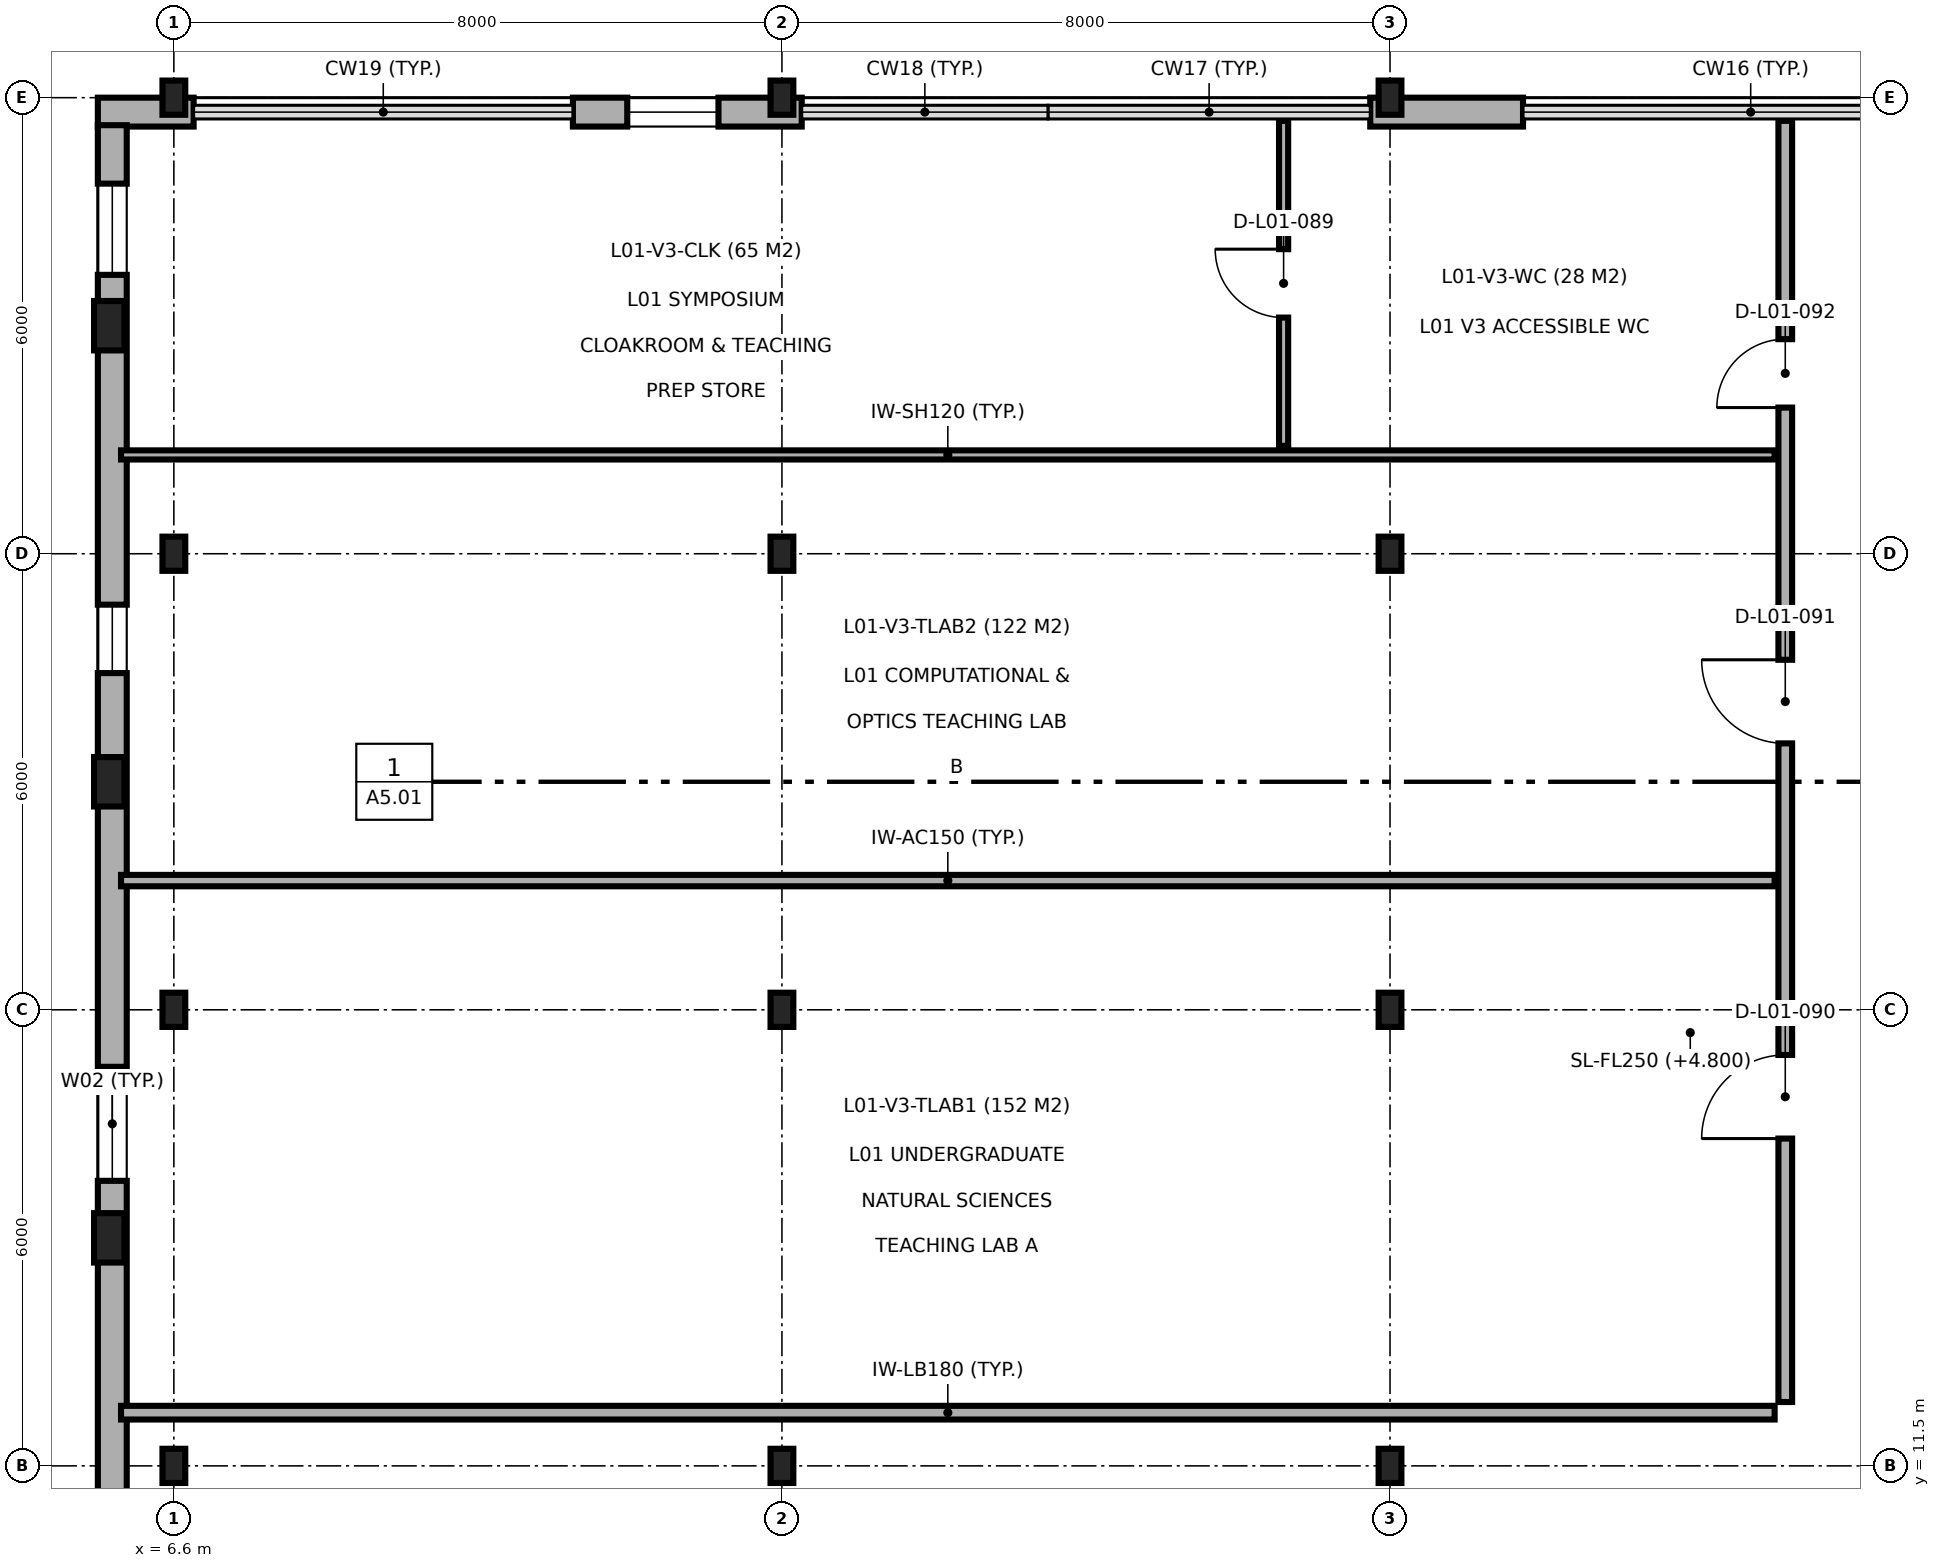
"""IFC4 building model, lengths in metres.
Left out: names, types, materials, properties, quantities, classifications, styles, units other than length and angle.
Written with IfcOpenShell. Run it as: python <this file> out.ifc"""

import sys

from ifc_helpers import new_model, si_unit, direction, frame, frame_2d, origin, origin_2d, place, context, subcontext, project, spatial, rectangle, i_section, extrude, element, fill, save


model = new_model("IFC4")
c1 = context("Model", 3, precision=1e-05, world=origin(), true_north=direction((0.0, 1.0)))
c2 = subcontext(c1, "Body", "Model", "MODEL_VIEW")
j1 = project(units=[si_unit("LENGTHUNIT", "METRE"), si_unit("PLANEANGLEUNIT", "RADIAN")], contexts=[c1])
p1 = place(None, origin())
s1 = spatial("IfcSite", under=j1, at=p1, CompositionType="ELEMENT")
p2 = place(p1, origin())
s2 = spatial("IfcBuilding", under=s1, at=p2, CompositionType="ELEMENT")
p3 = place(p2, frame((0.0, 0.0, 4.8)))
s3 = spatial("IfcBuildingStorey", under=s2, at=p3, CompositionType="ELEMENT", Elevation=4.8)
for number, where, z_axis, x_axis in (
    (1, (5.75, 14.5, 0.0), (0.0, 0.0, 1.0), (1.0, 0.0, 0.0)),
    (2, (5.75, 20.5, 0.0), (0.0, 0.0, 1.0), (1.0, 0.0, 0.0)),
    (3, (5.75, 26.5, 0.0), (0.0, 0.0, 1.0), (1.0, 0.0, 0.0)),
):
    element("IfcColumn", number, at=place(p3, frame(where, z_axis=z_axis, x_axis=x_axis)), inside=s3, PredefinedType="PILASTER", context=c2, shape_type="SweptSolid", body=[
        extrude(rectangle(XDim=0.4, YDim=0.65, at=origin_2d()), origin(), (0.0, 0.0, 1.0), 4.5),
    ])
for number, where, z_axis, x_axis in (
    (4, (6.6, 11.5, 0.0), (0.0, 0.0, 1.0), (1.0, 0.0, 0.0)),
    (5, (6.6, 17.5, 0.0), (0.0, 0.0, 1.0), (1.0, 0.0, 0.0)),
    (6, (6.6, 23.5, 0.0), (0.0, 0.0, 1.0), (1.0, 0.0, 0.0)),
    (7, (6.6, 29.5, 0.0), (0.0, 0.0, 1.0), (1.0, 0.0, 0.0)),
    (8, (14.6, 11.5, 0.0), (0.0, 0.0, 1.0), (1.0, 0.0, 0.0)),
    (9, (14.6, 17.5, 0.0), (0.0, 0.0, 1.0), (1.0, 0.0, 0.0)),
    (10, (14.6, 23.5, 0.0), (0.0, 0.0, 1.0), (1.0, 0.0, 0.0)),
    (11, (14.6, 29.5, 0.0), (0.0, 0.0, 1.0), (1.0, 0.0, 0.0)),
    (12, (22.6, 11.5, 0.0), (0.0, 0.0, 1.0), (1.0, 0.0, 0.0)),
    (13, (22.6, 17.5, 0.0), (0.0, 0.0, 1.0), (1.0, 0.0, 0.0)),
    (14, (22.6, 23.5, 0.0), (0.0, 0.0, 1.0), (1.0, 0.0, 0.0)),
    (15, (22.6, 29.5, 0.0), (0.0, 0.0, 1.0), (1.0, 0.0, 0.0)),
):
    element("IfcColumn", number, at=place(p3, frame(where, z_axis=z_axis, x_axis=x_axis)), inside=s3, PredefinedType="COLUMN", context=c2, shape_type="SweptSolid", body=[
        extrude(i_section(OverallWidth=0.3, OverallDepth=0.45, WebThickness=0.014, FlangeThickness=0.026, FilletRadius=0.027, at=origin_2d()), origin(), (0.0, 0.0, 1.0), 4.5),
    ])
p4 = place(p3, frame((24.35, 29.31, 0.0), z_axis=(0.0, 0.0, 1.0), x_axis=(-1.0, 0.0, 0.0)))
e16 = element("IfcWall", 16, at=p4, inside=s3, PredefinedType="SOLIDWALL", context=c2, shape_type="SweptSolid", body=[
    extrude(rectangle(XDim=2.01, YDim=0.38, at=frame_2d((1.005, 0.0))), origin(), (0.0, 0.0, 1.0), 4.25),
])
p5 = place(p3, frame((14.86, 29.31, 0.0), z_axis=(0.0, 0.0, 1.0), x_axis=(-1.0, 0.0, 0.0)))
e17 = element("IfcWall", 17, at=p5, inside=s3, PredefinedType="SOLIDWALL", context=c2, shape_type="SweptSolid", body=[
    extrude(rectangle(XDim=3.01, YDim=0.38, at=frame_2d((1.505, 0.0))), origin(), (0.0, 0.0, 1.0), 4.25),
])
p6 = place(p5, frame((1.095, 0.0, 0.9)))
e18 = element("IfcOpeningElement", 18, at=p6, cuts=e17, PredefinedType="OPENING", context=c2, shape_type="SweptSolid", body=[
    extrude(rectangle(XDim=1.2, YDim=1.8, at=frame_2d((0.6, 0.9))), frame((0.0, 0.2, 0.0), z_axis=(0.0, -1.0, 0.0), x_axis=(1.0, 0.0, 0.0)), (0.0, 0.0, 1.0), 0.4),
])
p7 = place(p3, frame((6.86, 29.31, 0.0), z_axis=(0.0, 0.0, 1.0), x_axis=(-1.0, 0.0, 0.0)))
e19 = element("IfcWall", 19, at=p7, inside=s3, PredefinedType="SOLIDWALL", context=c2, shape_type="SweptSolid", body=[
    extrude(rectangle(XDim=1.26, YDim=0.38, at=frame_2d((0.63, 0.0))), origin(), (0.0, 0.0, 1.0), 4.25),
])
p8 = place(p3, frame((5.79, 29.138, 0.0), z_axis=(0.0, 0.0, 1.0), x_axis=(0.0, -1.0, 0.0)))
e20 = element("IfcWall", 20, at=p8, inside=s3, PredefinedType="SOLIDWALL", context=c2, shape_type="SweptSolid", body=[
    extrude(rectangle(XDim=24.238, YDim=0.38, at=frame_2d((12.119, 0.0))), origin(), (0.0, 0.0, 1.0), 4.25),
])
p9 = place(p8, frame((0.769, 0.0, 0.9)))
e21 = element("IfcOpeningElement", 21, at=p9, cuts=e20, PredefinedType="OPENING", context=c2, shape_type="SweptSolid", body=[
    extrude(rectangle(XDim=1.2, YDim=1.8, at=frame_2d((0.6, 0.9))), frame((0.0, 0.2, 0.0), z_axis=(0.0, -1.0, 0.0), x_axis=(1.0, 0.0, 0.0)), (0.0, 0.0, 1.0), 0.4),
])
p10 = place(p8, frame((6.308, 0.0, 0.9)))
e22 = element("IfcOpeningElement", 22, at=p10, cuts=e20, PredefinedType="OPENING", context=c2, shape_type="SweptSolid", body=[
    extrude(rectangle(XDim=0.9, YDim=1.8, at=frame_2d((0.45, 0.9))), frame((0.0, 0.2, 0.0), z_axis=(0.0, -1.0, 0.0), x_axis=(1.0, 0.0, 0.0)), (0.0, 0.0, 1.0), 0.4),
])
p11 = place(p8, frame((12.388, 0.0, 0.9)))
e23 = element("IfcOpeningElement", 23, at=p11, cuts=e20, PredefinedType="OPENING", context=c2, shape_type="SweptSolid", body=[
    extrude(rectangle(XDim=1.5, YDim=1.8, at=frame_2d((0.75, 0.9))), frame((0.0, 0.2, 0.0), z_axis=(0.0, -1.0, 0.0), x_axis=(1.0, 0.0, 0.0)), (0.0, 0.0, 1.0), 0.4),
])
p12 = place(p8, frame((18.538, 0.0, 0.9)))
e24 = element("IfcOpeningElement", 24, at=p12, cuts=e20, PredefinedType="OPENING", context=c2, shape_type="SweptSolid", body=[
    extrude(rectangle(XDim=1.2, YDim=1.8, at=frame_2d((0.6, 0.9))), frame((0.0, 0.2, 0.0), z_axis=(0.0, -1.0, 0.0), x_axis=(1.0, 0.0, 0.0)), (0.0, 0.0, 1.0), 0.4),
])
p13 = place(p8, frame((21.528, 0.0, 0.9)))
e25 = element("IfcOpeningElement", 25, at=p13, cuts=e20, PredefinedType="OPENING", context=c2, shape_type="SweptSolid", body=[
    extrude(rectangle(XDim=1.2, YDim=1.8, at=frame_2d((0.6, 0.9))), frame((0.0, 0.2, 0.0), z_axis=(0.0, -1.0, 0.0), x_axis=(1.0, 0.0, 0.0)), (0.0, 0.0, 1.0), 0.4),
])
p14 = place(p3, frame((5.905, 12.2, 0.0), z_axis=(0.0, 0.0, 1.0), x_axis=(1.0, 0.0, 0.0)))
e26 = element("IfcWall", 26, at=p14, inside=s3, PredefinedType="PARTITIONING", context=c2, shape_type="SweptSolid", body=[
    extrude(rectangle(XDim=21.755, YDim=0.18, at=frame_2d((10.877, 0.0))), origin(), (0.0, 0.0, 1.0), 4.25),
])
p15 = place(p3, frame((5.905, 19.2, 0.0), z_axis=(0.0, 0.0, 1.0), x_axis=(1.0, 0.0, 0.0)))
e27 = element("IfcWall", 27, at=p15, inside=s3, PredefinedType="PARTITIONING", context=c2, shape_type="SweptSolid", body=[
    extrude(rectangle(XDim=21.755, YDim=0.15, at=frame_2d((10.877, 0.0))), origin(), (0.0, 0.0, 1.0), 4.25),
])
p16 = place(p3, frame((5.905, 24.8, 0.0), z_axis=(0.0, 0.0, 1.0), x_axis=(1.0, 0.0, 0.0)))
e28 = element("IfcWall", 28, at=p16, inside=s3, PredefinedType="PARTITIONING", context=c2, shape_type="SweptSolid", body=[
    extrude(rectangle(XDim=21.755, YDim=0.12, at=frame_2d((10.877, 0.0))), origin(), (0.0, 0.0, 1.0), 4.25),
])
p17 = place(p3, frame((21.2, 24.92, 0.0), z_axis=(0.0, 0.0, 1.0), x_axis=(0.0, 1.0, 0.0)))
e29 = element("IfcWall", 29, at=p17, inside=s3, PredefinedType="PARTITIONING", context=c2, shape_type="SweptSolid", body=[
    extrude(rectangle(XDim=4.275, YDim=0.12, at=frame_2d((2.138, 0.0))), origin(), (0.0, 0.0, 1.0), 4.25),
])
p18 = place(p17, frame((1.687, 0.0, 0.0)))
e30 = element("IfcOpeningElement", 30, at=p18, cuts=e29, PredefinedType="OPENING", context=c2, shape_type="SweptSolid", body=[
    extrude(rectangle(XDim=0.9, YDim=2.1, at=frame_2d((0.45, 1.05))), frame((0.0, 0.07, 0.0), z_axis=(0.0, -1.0, 0.0), x_axis=(1.0, 0.0, 0.0)), (0.0, 0.0, 1.0), 0.14),
])
p19 = place(p3, frame((27.8, 12.34, 0.0), z_axis=(0.0, 0.0, 1.0), x_axis=(0.0, 1.0, 0.0)))
e31 = element("IfcWall", 31, at=p19, inside=s3, PredefinedType="PARTITIONING", context=c2, shape_type="SweptSolid", body=[
    extrude(rectangle(XDim=16.855, YDim=0.18, at=frame_2d((8.427, 0.0))), origin(), (0.0, 0.0, 1.0), 4.01),
])
p20 = place(p19, frame((3.466, 0.0, 0.0)))
e32 = element("IfcOpeningElement", 32, at=p20, cuts=e31, PredefinedType="OPENING", context=c2, shape_type="SweptSolid", body=[
    extrude(rectangle(XDim=1.1, YDim=2.15, at=frame_2d((0.55, 1.075))), frame((0.0, 0.1, 0.0), z_axis=(0.0, -1.0, 0.0), x_axis=(1.0, 0.0, 0.0)), (0.0, 0.0, 1.0), 0.2),
])
p21 = place(p19, frame((8.665, 0.0, 0.0)))
e33 = element("IfcOpeningElement", 33, at=p21, cuts=e31, PredefinedType="OPENING", context=c2, shape_type="SweptSolid", body=[
    extrude(rectangle(XDim=1.1, YDim=2.15, at=frame_2d((0.55, 1.075))), frame((0.0, 0.1, 0.0), z_axis=(0.0, -1.0, 0.0), x_axis=(1.0, 0.0, 0.0)), (0.0, 0.0, 1.0), 0.2),
])
p22 = place(p19, frame((13.083, 0.0, 0.0)))
e34 = element("IfcOpeningElement", 34, at=p22, cuts=e31, PredefinedType="OPENING", context=c2, shape_type="SweptSolid", body=[
    extrude(rectangle(XDim=0.9, YDim=2.1, at=frame_2d((0.45, 1.05))), frame((0.0, 0.1, 0.0), z_axis=(0.0, -1.0, 0.0), x_axis=(1.0, 0.0, 0.0)), (0.0, 0.0, 1.0), 0.2),
])
p23 = place(p6, origin())
e35 = element("IfcWindow", 35, at=p23, inside=s3, PartitioningType="SINGLE_PANEL", PredefinedType="WINDOW", context=c2, shape_type="SweptSolid", body=[
    extrude(rectangle(XDim=1.2, YDim=1.8, at=frame_2d((0.6, 0.9))), frame((0.0, 0.03, 0.0), z_axis=(0.0, -1.0, 0.0), x_axis=(1.0, 0.0, 0.0)), (0.0, 0.0, 1.0), 0.06),
])
fill(e18, e35)
p24 = place(p9, origin())
e36 = element("IfcWindow", 36, at=p24, inside=s3, PartitioningType="SINGLE_PANEL", PredefinedType="WINDOW", context=c2, shape_type="SweptSolid", body=[
    extrude(rectangle(XDim=1.2, YDim=1.8, at=frame_2d((0.6, 0.9))), frame((0.0, 0.03, 0.0), z_axis=(0.0, -1.0, 0.0), x_axis=(1.0, 0.0, 0.0)), (0.0, 0.0, 1.0), 0.06),
])
fill(e21, e36)
p25 = place(p10, origin())
e37 = element("IfcWindow", 37, at=p25, inside=s3, PartitioningType="SINGLE_PANEL", PredefinedType="WINDOW", context=c2, shape_type="SweptSolid", body=[
    extrude(rectangle(XDim=0.9, YDim=1.8, at=frame_2d((0.45, 0.9))), frame((0.0, 0.03, 0.0), z_axis=(0.0, -1.0, 0.0), x_axis=(1.0, 0.0, 0.0)), (0.0, 0.0, 1.0), 0.06),
])
fill(e22, e37)
p26 = place(p11, origin())
e38 = element("IfcWindow", 38, at=p26, inside=s3, PartitioningType="SINGLE_PANEL", PredefinedType="WINDOW", context=c2, shape_type="SweptSolid", body=[
    extrude(rectangle(XDim=1.5, YDim=1.8, at=frame_2d((0.75, 0.9))), frame((0.0, 0.03, 0.0), z_axis=(0.0, -1.0, 0.0), x_axis=(1.0, 0.0, 0.0)), (0.0, 0.0, 1.0), 0.06),
])
fill(e23, e38)
p27 = place(p18, origin())
e39 = element("IfcDoor", 39, at=p27, inside=s3, OperationType="SINGLE_SWING_RIGHT", PredefinedType="DOOR", context=c2, shape_type="SweptSolid", body=[
    extrude(rectangle(XDim=0.9, YDim=2.1, at=frame_2d((0.45, 1.05))), frame((0.0, 0.025, 0.0), z_axis=(0.0, -1.0, 0.0), x_axis=(1.0, 0.0, 0.0)), (0.0, 0.0, 1.0), 0.05),
])
fill(e30, e39)
p28 = place(p20, origin())
e40 = element("IfcDoor", 40, at=p28, inside=s3, OperationType="SINGLE_SWING_LEFT", PredefinedType="DOOR", context=c2, shape_type="SweptSolid", body=[
    extrude(rectangle(XDim=1.1, YDim=2.15, at=frame_2d((0.55, 1.075))), frame((0.0, 0.025, 0.0), z_axis=(0.0, -1.0, 0.0), x_axis=(1.0, 0.0, 0.0)), (0.0, 0.0, 1.0), 0.05),
])
fill(e32, e40)
p29 = place(p21, origin())
e41 = element("IfcDoor", 41, at=p29, inside=s3, OperationType="SINGLE_SWING_RIGHT", PredefinedType="DOOR", context=c2, shape_type="SweptSolid", body=[
    extrude(rectangle(XDim=1.1, YDim=2.15, at=frame_2d((0.55, 1.075))), frame((0.0, 0.025, 0.0), z_axis=(0.0, -1.0, 0.0), x_axis=(1.0, 0.0, 0.0)), (0.0, 0.0, 1.0), 0.05),
])
fill(e33, e41)
p30 = place(p22, origin())
e42 = element("IfcDoor", 42, at=p30, inside=s3, OperationType="SINGLE_SWING_LEFT", PredefinedType="DOOR", context=c2, shape_type="SweptSolid", body=[
    extrude(rectangle(XDim=0.9, YDim=2.1, at=frame_2d((0.45, 1.05))), frame((0.0, 0.025, 0.0), z_axis=(0.0, -1.0, 0.0), x_axis=(1.0, 0.0, 0.0)), (0.0, 0.0, 1.0), 0.05),
])
fill(e34, e42)
save(model, sys.argv[1])
